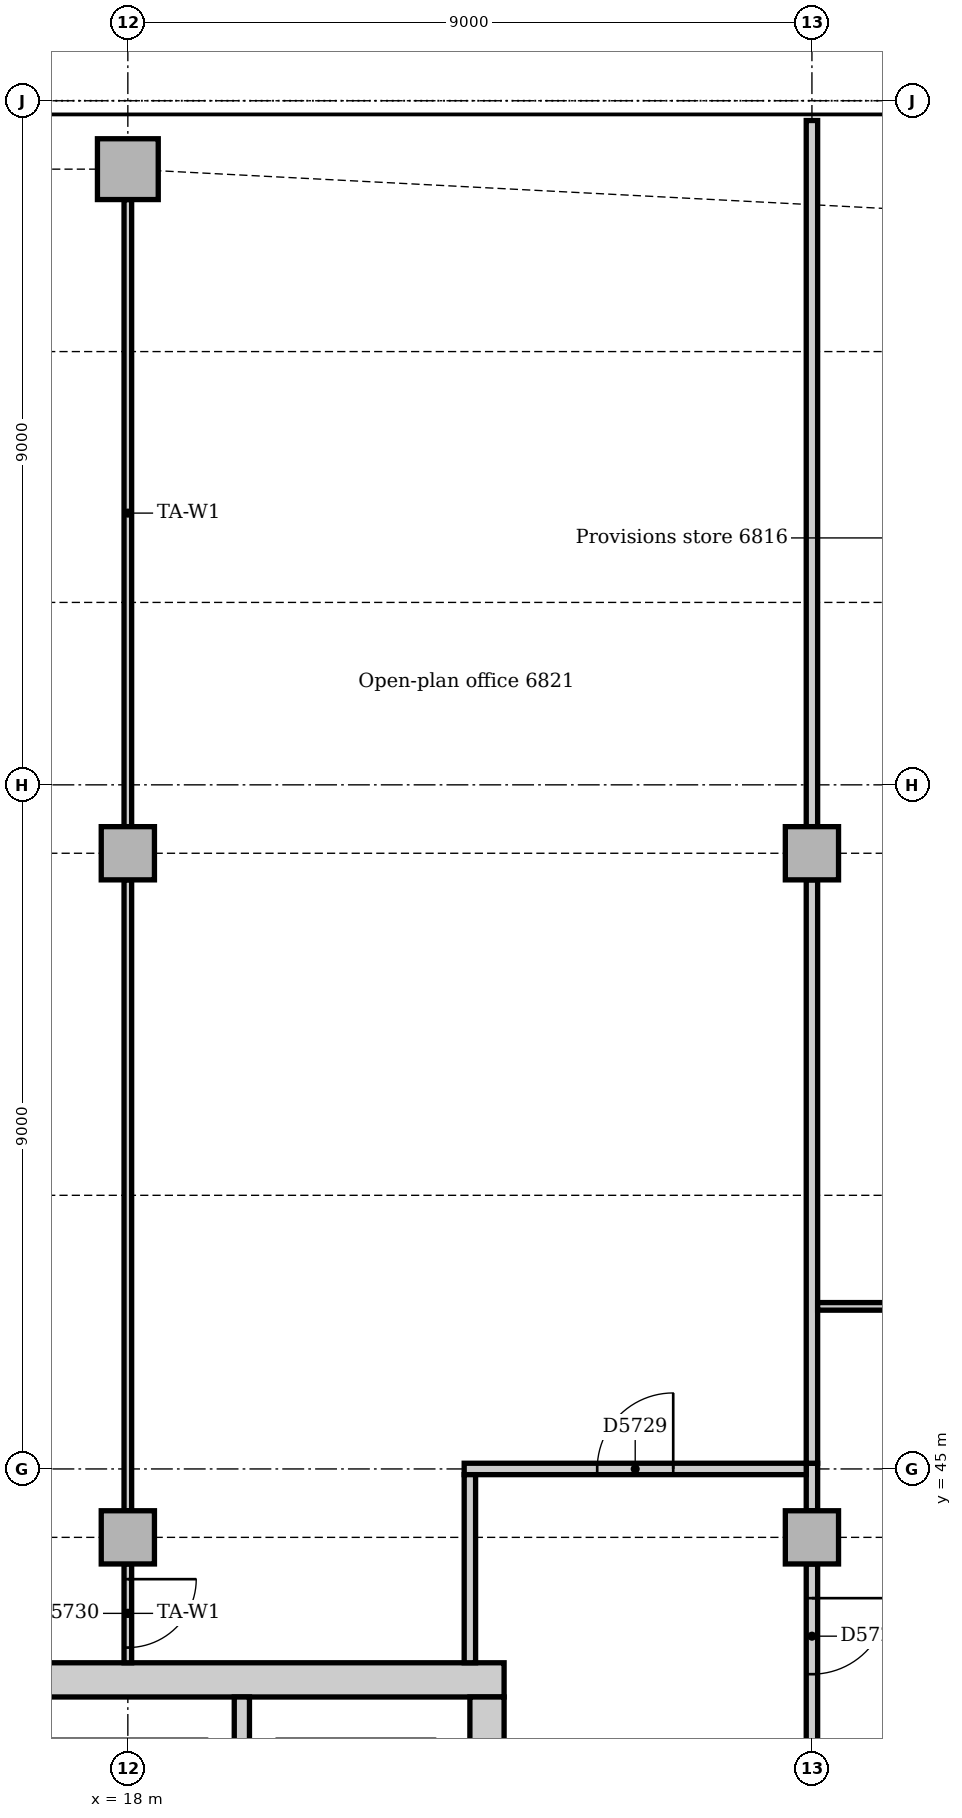
"""IFC4 building model, lengths in metres.
Left out: names, types, materials, properties, quantities, classifications, styles, units other than length and angle.
Written with IfcOpenShell. Run it as: python <this file> out.ifc"""

import sys

from ifc_helpers import new_model, si_unit, direction, frame, frame_2d, origin, origin_2d, place, context, subcontext, project, spatial, rectangle, extrude, element, fill, save


model = new_model("IFC4")
c1 = context("Model", 3, precision=1e-05, world=origin(), true_north=direction((0.0, 1.0)))
c2 = subcontext(c1, "Body", "Model", "MODEL_VIEW")
j1 = project(units=[si_unit("LENGTHUNIT", "METRE"), si_unit("PLANEANGLEUNIT", "RADIAN")], contexts=[c1])
p1 = place(None, origin())
s1 = spatial("IfcSite", under=j1, at=p1, CompositionType="ELEMENT")
p2 = place(p1, origin())
s2 = spatial("IfcBuilding", under=s1, at=p2, CompositionType="ELEMENT")
p3 = place(p2, frame((0.0, 0.0, 283.0)))
s3 = spatial("IfcBuildingStorey", under=s2, at=p3, CompositionType="ELEMENT", Elevation=283.0)
p4 = place(p3, frame((22.95, 42.225, 0.0), z_axis=(0.0, 0.0, 1.0), x_axis=(-1.0, 0.0, 0.0)))
e1 = element("IfcWall", 1, at=p4, inside=s3, PredefinedType="SOLIDWALL", context=c2, shape_type="SweptSolid", body=[
    extrude(rectangle(XDim=18.9, YDim=0.45, at=frame_2d((9.45, 0.0))), origin(), (0.0, 0.0, 1.0), 8.0),
])
p5 = place(p3, frame((22.725, 31.5, 0.0), z_axis=(0.0, 0.0, 1.0), x_axis=(0.0, 1.0, 0.0)))
e2 = element("IfcWall", 2, at=p5, inside=s3, PredefinedType="SOLIDWALL", context=c2, shape_type="SweptSolid", body=[
    extrude(rectangle(XDim=10.5, YDim=0.45, at=frame_2d((5.25, 0.0))), origin(), (0.0, 0.0, 1.0), 8.0),
])
p6 = place(p5, frame((3.15, 0.0, 0.0)))
e3 = element("IfcOpeningElement", 3, at=p6, cuts=e2, PredefinedType="OPENING", context=c2, shape_type="SweptSolid", body=[
    extrude(rectangle(XDim=1.0, YDim=2.1, at=frame_2d((0.5, 1.05))), frame((0.0, 0.235, 0.0), z_axis=(0.0, -1.0, 0.0), x_axis=(1.0, 0.0, 0.0)), (0.0, 0.0, 1.0), 0.47),
])
p7 = place(p5, frame((5.2, 0.0, 0.0)))
e4 = element("IfcOpeningElement", 4, at=p7, cuts=e2, PredefinedType="OPENING", context=c2, shape_type="SweptSolid", body=[
    extrude(rectangle(XDim=1.0, YDim=2.1, at=frame_2d((0.5, 1.05))), frame((0.0, 0.235, 0.0), z_axis=(0.0, -1.0, 0.0), x_axis=(1.0, 0.0, 0.0)), (0.0, 0.0, 1.0), 0.47),
])
p8 = place(p3, frame((18.0, 62.1, 0.0), z_axis=(0.0, 0.0, 1.0), x_axis=(1.0, 0.0, 0.0)))
e5 = element("IfcColumn", 5, at=p8, inside=s3, PredefinedType="COLUMN", context=c2, shape_type="SweptSolid", body=[
    extrude(rectangle(XDim=0.8, YDim=0.8, at=origin_2d()), origin(), (0.0, 0.0, 1.0), 7.7),
])
for number, where, z_axis, x_axis in (
    (6, (18.0, 44.1, 0.0), (0.0, 0.0, 1.0), (1.0, 0.0, 0.0)),
    (7, (18.0, 53.1, 0.0), (0.0, 0.0, 1.0), (1.0, 0.0, 0.0)),
    (8, (27.0, 44.1, 0.0), (0.0, 0.0, 1.0), (1.0, 0.0, 0.0)),
    (9, (27.0, 53.1, 0.0), (0.0, 0.0, 1.0), (1.0, 0.0, 0.0)),
):
    element("IfcColumn", number, at=place(p3, frame(where, z_axis=z_axis, x_axis=x_axis)), inside=s3, PredefinedType="COLUMN", context=c2, shape_type="SweptSolid", body=[
        extrude(rectangle(XDim=0.7, YDim=0.7, at=origin_2d()), origin(), (0.0, 0.0, 1.0), 7.7),
    ])
p9 = place(p3, frame((19.5, 38.6, 0.0), z_axis=(0.0, 0.0, 1.0), x_axis=(0.0, 1.0, 0.0)))
e10 = element("IfcWall", 10, at=p9, inside=s3, PredefinedType="PARTITIONING", context=c2, shape_type="SweptSolid", body=[
    extrude(rectangle(XDim=3.4, YDim=0.2, at=frame_2d((1.7, 0.0))), origin(), (0.0, 0.0, 1.0), 7.7),
])
p10 = place(p3, frame((27.0, 36.35, 0.0), z_axis=(0.0, 0.0, 1.0), x_axis=(0.0, 1.0, 0.0)))
e11 = element("IfcWall", 11, at=p10, inside=s3, PredefinedType="PARTITIONING", context=c2, shape_type="SweptSolid", body=[
    extrude(rectangle(XDim=7.4, YDim=0.15, at=frame_2d((3.7, 0.0))), origin(), (0.0, 0.0, 1.0), 7.25),
])
p11 = place(p10, frame((5.95, 0.0, 0.0)))
e12 = element("IfcOpeningElement", 12, at=p11, cuts=e11, PredefinedType="OPENING", context=c2, shape_type="SweptSolid", body=[
    extrude(rectangle(XDim=1.0, YDim=2.1, at=frame_2d((0.5, 1.05))), frame((0.0, 0.085, 0.0), z_axis=(0.0, -1.0, 0.0), x_axis=(1.0, 0.0, 0.0)), (0.0, 0.0, 1.0), 0.17),
])
p12 = place(p3, frame((27.0, 44.45, 0.0), z_axis=(0.0, 0.0, 1.0), x_axis=(0.0, 1.0, 0.0)))
e13 = element("IfcWall", 13, at=p12, inside=s3, PredefinedType="PARTITIONING", context=c2, shape_type="SweptSolid", body=[
    extrude(rectangle(XDim=0.625, YDim=0.15, at=frame_2d((0.312, 0.0))), origin(), (0.0, 0.0, 1.0), 7.25),
])
p13 = place(p3, frame((22.425, 45.0, 0.0), z_axis=(0.0, 0.0, 1.0), x_axis=(1.0, 0.0, 0.0)))
e14 = element("IfcWall", 14, at=p13, inside=s3, PredefinedType="PARTITIONING", context=c2, shape_type="SweptSolid", body=[
    extrude(rectangle(XDim=4.5, YDim=0.15, at=frame_2d((2.25, 0.0))), origin(), (0.0, 0.0, 1.0), 7.7),
])
p14 = place(p13, frame((1.75, 0.0, 0.0)))
e15 = element("IfcOpeningElement", 15, at=p14, cuts=e14, PredefinedType="OPENING", context=c2, shape_type="SweptSolid", body=[
    extrude(rectangle(XDim=1.0, YDim=2.1, at=frame_2d((0.5, 1.05))), frame((0.0, 0.085, 0.0), z_axis=(0.0, -1.0, 0.0), x_axis=(1.0, 0.0, 0.0)), (0.0, 0.0, 1.0), 0.17),
])
p15 = place(p3, frame((22.5, 42.45, 0.0), z_axis=(0.0, 0.0, 1.0), x_axis=(0.0, 1.0, 0.0)))
e16 = element("IfcWall", 16, at=p15, inside=s3, PredefinedType="PARTITIONING", context=c2, shape_type="SweptSolid", body=[
    extrude(rectangle(XDim=2.475, YDim=0.15, at=frame_2d((1.238, 0.0))), origin(), (0.0, 0.0, 1.0), 7.7),
])
p16 = place(p3, frame((27.0, 53.45, 0.0), z_axis=(0.0, 0.0, 1.0), x_axis=(0.0, 1.0, 0.0)))
e17 = element("IfcWall", 17, at=p16, inside=s3, PredefinedType="PARTITIONING", context=c2, shape_type="SweptSolid", body=[
    extrude(rectangle(XDim=9.29, YDim=0.15, at=frame_2d((4.645, 0.0))), origin(), (0.0, 0.0, 1.0), 7.25),
])
p17 = place(p3, frame((27.0, 45.075, 0.0), z_axis=(0.0, 0.0, 1.0), x_axis=(0.0, 1.0, 0.0)))
e18 = element("IfcWall", 18, at=p17, inside=s3, PredefinedType="PARTITIONING", context=c2, shape_type="SweptSolid", body=[
    extrude(rectangle(XDim=7.675, YDim=0.15, at=frame_2d((3.837, 0.0))), origin(), (0.0, 0.0, 1.0), 7.25),
])
p18 = place(p3, frame((18.0, 42.45, 0.0), z_axis=(0.0, 0.0, 1.0), x_axis=(0.0, 1.0, 0.0)))
e19 = element("IfcWall", 19, at=p18, inside=s3, PredefinedType="PARTITIONING", context=c2, shape_type="SweptSolid", body=[
    extrude(rectangle(XDim=1.3, YDim=0.1, at=frame_2d((0.65, 0.0))), origin(), (0.0, 0.0, 1.0), 7.502),
])
p19 = place(p18, frame((0.2, 0.0, 0.0)))
e20 = element("IfcOpeningElement", 20, at=p19, cuts=e19, PredefinedType="OPENING", context=c2, shape_type="SweptSolid", body=[
    extrude(rectangle(XDim=0.9, YDim=2.1, at=frame_2d((0.45, 1.05))), frame((0.0, 0.06, 0.0), z_axis=(0.0, -1.0, 0.0), x_axis=(1.0, 0.0, 0.0)), (0.0, 0.0, 1.0), 0.12),
])
p20 = place(p3, frame((18.0, 44.45, 0.0), z_axis=(0.0, 0.0, 1.0), x_axis=(0.0, 1.0, 0.0)))
e21 = element("IfcWall", 21, at=p20, inside=s3, PredefinedType="PARTITIONING", context=c2, shape_type="SweptSolid", body=[
    extrude(rectangle(XDim=8.3, YDim=0.1, at=frame_2d((4.15, 0.0))), origin(), (0.0, 0.0, 1.0), 7.25),
])
p21 = place(p3, frame((18.0, 53.45, 0.0), z_axis=(0.0, 0.0, 1.0), x_axis=(0.0, 1.0, 0.0)))
e22 = element("IfcWall", 22, at=p21, inside=s3, PredefinedType="PARTITIONING", context=c2, shape_type="SweptSolid", body=[
    extrude(rectangle(XDim=8.25, YDim=0.1, at=frame_2d((4.125, 0.0))), origin(), (0.0, 0.0, 1.0), 7.25),
])
p22 = place(p3, frame((27.075, 47.139, 0.0), z_axis=(0.0, 0.0, 1.0), x_axis=(1.0, 0.0, 0.0)))
e23 = element("IfcWall", 23, at=p22, inside=s3, PredefinedType="PARTITIONING", context=c2, shape_type="SweptSolid", body=[
    extrude(rectangle(XDim=2.875, YDim=0.1, at=frame_2d((1.438, 0.0))), origin(), (0.0, 0.0, 1.0), 7.7),
])
p23 = place(p22, frame((1.0, 0.0, 0.0)))
e24 = element("IfcOpeningElement", 24, at=p23, cuts=e23, PredefinedType="OPENING", context=c2, shape_type="SweptSolid", body=[
    extrude(rectangle(XDim=0.9, YDim=2.1, at=frame_2d((0.45, 1.05))), frame((0.0, 0.06, 0.0), z_axis=(0.0, -1.0, 0.0), x_axis=(1.0, 0.0, 0.0)), (0.0, 0.0, 1.0), 0.12),
])
p24 = place(p11, frame((1.0, 0.0, 0.0), z_axis=(0.0, 0.0, 1.0), x_axis=(-1.0, 0.0, 0.0)))
e25 = element("IfcDoor", 25, at=p24, inside=s3, OperationType="SINGLE_SWING_LEFT", PredefinedType="DOOR", context=c2, shape_type="SweptSolid", body=[
    extrude(rectangle(XDim=1.0, YDim=2.1, at=frame_2d((0.5, 1.05))), frame((0.0, 0.025, 0.0), z_axis=(0.0, -1.0, 0.0), x_axis=(1.0, 0.0, 0.0)), (0.0, 0.0, 1.0), 0.05),
])
fill(e12, e25)
p25 = place(p14, origin())
e26 = element("IfcDoor", 26, at=p25, inside=s3, OperationType="SINGLE_SWING_RIGHT", PredefinedType="DOOR", context=c2, shape_type="SweptSolid", body=[
    extrude(rectangle(XDim=1.0, YDim=2.1, at=frame_2d((0.5, 1.05))), frame((0.0, 0.025, 0.0), z_axis=(0.0, -1.0, 0.0), x_axis=(1.0, 0.0, 0.0)), (0.0, 0.0, 1.0), 0.05),
])
fill(e15, e26)
p26 = place(p19, frame((0.9, 0.0, 0.0), z_axis=(0.0, 0.0, 1.0), x_axis=(-1.0, 0.0, 0.0)))
e27 = element("IfcDoor", 27, at=p26, inside=s3, OperationType="SINGLE_SWING_LEFT", PredefinedType="DOOR", context=c2, shape_type="SweptSolid", body=[
    extrude(rectangle(XDim=0.9, YDim=2.1, at=frame_2d((0.45, 1.05))), frame((0.0, 0.025, 0.0), z_axis=(0.0, -1.0, 0.0), x_axis=(1.0, 0.0, 0.0)), (0.0, 0.0, 1.0), 0.05),
])
fill(e20, e27)
save(model, sys.argv[1])
